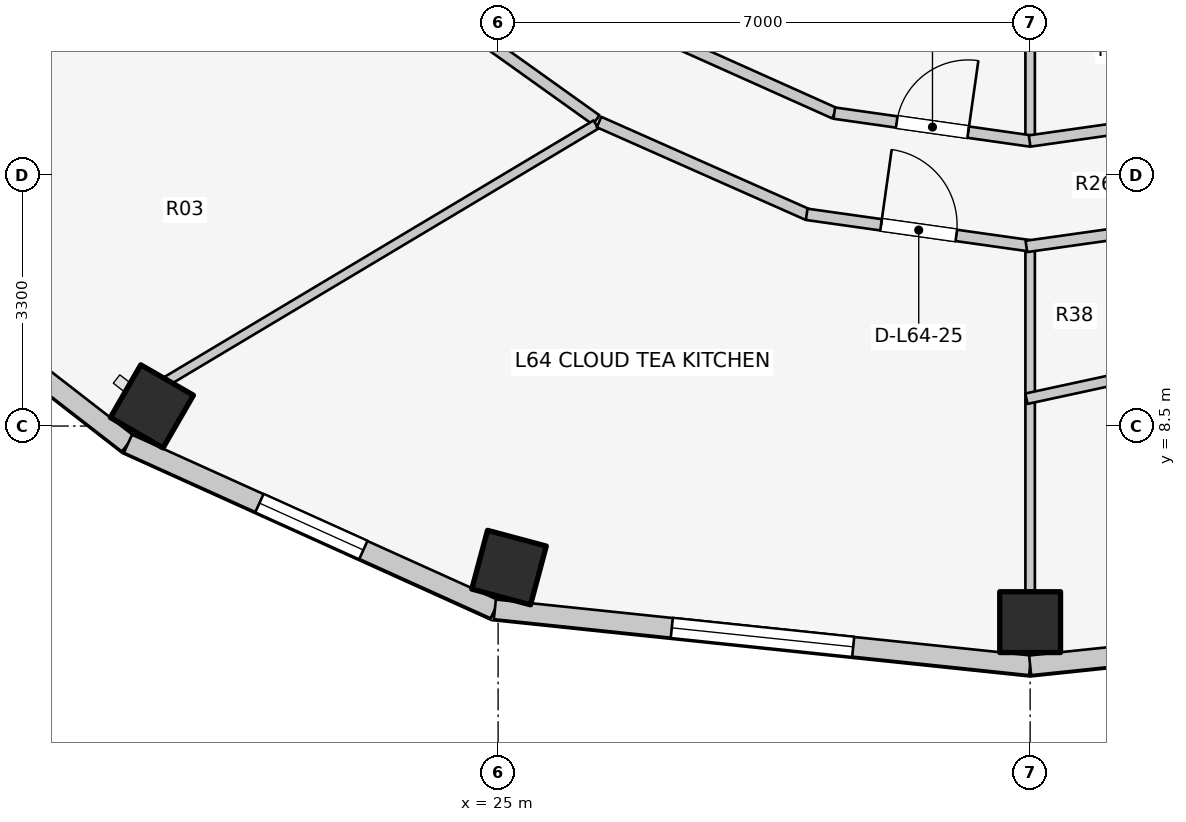
"""IFC4 building model, lengths in metres.
Left out: names, types, materials, properties, quantities, classifications, styles, units other than length and angle.
Written with IfcOpenShell. Run it as: python <this file> out.ifc"""

import sys

from ifc_helpers import new_model, si_unit, direction, frame, frame_2d, origin, origin_2d, place, context, subcontext, project, spatial, rectangle, extrude, element, fill, save


model = new_model("IFC4")
c1 = context("Model", 3, precision=1e-05, world=origin(), true_north=direction((0.0, 1.0)))
c2 = subcontext(c1, "Body", "Model", "MODEL_VIEW")
j1 = project(units=[si_unit("LENGTHUNIT", "METRE"), si_unit("PLANEANGLEUNIT", "RADIAN")], contexts=[c1])
p1 = place(None, origin())
s1 = spatial("IfcSite", under=j1, at=p1, CompositionType="ELEMENT")
p2 = place(p1, origin())
s2 = spatial("IfcBuilding", under=s1, at=p2, CompositionType="ELEMENT")
p3 = place(p2, frame((0.0, 0.0, 210.9)))
s3 = spatial("IfcBuildingStorey", under=s2, at=p3, CompositionType="ELEMENT", Elevation=210.9)
for number, where, z_axis, x_axis in (
    (1, (20.445, 8.759, 0.0), (0.0, 0.0, 1.0), (-0.5, -0.866, 0.0)),
    (2, (25.144, 6.638, 0.0), (0.0, 0.0, 1.0), (-0.259, -0.966, 0.0)),
    (3, (32.0, 5.92, 0.0), (0.0, 0.0, 1.0), (0.0, -1.0, 0.0)),
):
    element("IfcColumn", number, at=place(p3, frame(where, z_axis=z_axis, x_axis=x_axis)), inside=s3, PredefinedType="COLUMN", context=c2, shape_type="SweptSolid", body=[
        extrude(rectangle(XDim=0.8, YDim=0.8, at=origin_2d()), origin(), (0.0, 0.0, 1.0), 3.1),
    ])
p4 = place(p3, frame((16.442, 11.128, 0.0), z_axis=(0.0, 0.0, 1.0), x_axis=(0.790126214723, -0.612944177563, 0.0)))
e4 = element("IfcWall", 4, at=p4, inside=s3, PredefinedType="STANDARD", context=c2, shape_type="SweptSolid", body=[
    extrude(rectangle(XDim=4.667, YDim=0.26, at=frame_2d((2.333, 0.0))), origin(), (0.0, 0.0, 1.0), 2.85),
])
p5 = place(p3, frame((20.13, 8.267, 0.0), z_axis=(0.0, 0.0, 1.0), x_axis=(0.911427484938, -0.411460738952, 0.0)))
e5 = element("IfcWall", 5, at=p5, inside=s3, PredefinedType="STANDARD", context=c2, shape_type="SweptSolid", body=[
    extrude(rectangle(XDim=5.296, YDim=0.26, at=frame_2d((2.648, 0.0))), origin(), (0.0, 0.0, 1.0), 2.85),
])
p6 = place(p5, frame((1.898, 0.0, 0.75)))
e6 = element("IfcOpeningElement", 6, at=p6, cuts=e5, PredefinedType="OPENING", context=c2, shape_type="SweptSolid", body=[
    extrude(rectangle(XDim=1.5, YDim=1.6, at=frame_2d((0.75, 0.8))), frame((0.0, 0.14, 0.0), z_axis=(0.0, -1.0, 0.0), x_axis=(1.0, 0.0, 0.0)), (0.0, 0.0, 1.0), 0.28),
])
p7 = place(p3, frame((24.957, 6.088, 0.0), z_axis=(0.0, 0.0, 1.0), x_axis=(0.994582822721, -0.103947144014, 0.0)))
e7 = element("IfcWall", 7, at=p7, inside=s3, PredefinedType="STANDARD", context=c2, shape_type="SweptSolid", body=[
    extrude(rectangle(XDim=7.081, YDim=0.26, at=frame_2d((3.541, 0.0))), origin(), (0.0, 0.0, 1.0), 2.85),
])
p8 = place(p7, frame((2.341, 0.0, 0.75)))
e8 = element("IfcOpeningElement", 8, at=p8, cuts=e7, PredefinedType="OPENING", context=c2, shape_type="SweptSolid", body=[
    extrude(rectangle(XDim=2.4, YDim=1.7, at=frame_2d((1.2, 0.85))), frame((0.0, 0.14, 0.0), z_axis=(0.0, -1.0, 0.0), x_axis=(1.0, 0.0, 0.0)), (0.0, 0.0, 1.0), 0.28),
])
p9 = place(p3, frame((32.0, 5.352, 0.0), z_axis=(0.0, 0.0, 1.0), x_axis=(0.994582822721, 0.103947144014, 0.0)))
e9 = element("IfcWall", 9, at=p9, inside=s3, PredefinedType="STANDARD", context=c2, shape_type="SweptSolid", body=[
    extrude(rectangle(XDim=7.081, YDim=0.26, at=frame_2d((3.541, 0.0))), origin(), (0.0, 0.0, 1.0), 2.85),
])
p10 = place(p9, frame((2.791, 0.0, 0.75)))
e10 = element("IfcOpeningElement", 10, at=p10, cuts=e9, PredefinedType="OPENING", context=c2, shape_type="SweptSolid", body=[
    extrude(rectangle(XDim=1.5, YDim=1.6, at=frame_2d((0.75, 0.8))), frame((0.0, 0.14, 0.0), z_axis=(0.0, -1.0, 0.0), x_axis=(1.0, 0.0, 0.0)), (0.0, 0.0, 1.0), 0.28),
])
p11 = place(p3, frame((32.0, 14.9, 0.0), z_axis=(0.0, 0.0, 1.0), x_axis=(0.0, -1.0, 0.0)))
e11 = element("IfcWall", 11, at=p11, inside=s3, PredefinedType="PARTITIONING", context=c2, shape_type="SweptSolid", body=[
    extrude(rectangle(XDim=2.65, YDim=0.125, at=frame_2d((1.325, 0.0))), origin(), (0.0, 0.0, 1.0), 2.376),
])
p12 = place(p3, frame((27.019, 13.694, 0.0), z_axis=(0.0, 0.0, 1.0), x_axis=(0.912628408652, -0.408790151203, 0.0)))
e12 = element("IfcWall", 12, at=p12, inside=s3, PredefinedType="PARTITIONING", context=c2, shape_type="SweptSolid", body=[
    extrude(rectangle(XDim=2.638, YDim=0.15, at=frame_2d((1.319, 0.0))), origin(), (0.0, 0.0, 1.0), 2.376),
])
p13 = place(p3, frame((29.423, 12.617, 0.0), z_axis=(0.0, 0.0, 1.0), x_axis=(0.990078185178, -0.140517569133, 0.0)))
e13 = element("IfcWall", 13, at=p13, inside=s3, PredefinedType="PARTITIONING", context=c2, shape_type="SweptSolid", body=[
    extrude(rectangle(XDim=2.61, YDim=0.15, at=frame_2d((1.305, 0.0))), origin(), (0.0, 0.0, 1.0), 2.376),
])
p14 = place(p13, frame((0.83, 0.0, 0.0)))
e14 = element("IfcOpeningElement", 14, at=p14, cuts=e13, PredefinedType="OPENING", context=c2, shape_type="SweptSolid", body=[
    extrude(rectangle(XDim=0.95, YDim=2.1, at=frame_2d((0.475, 1.05))), frame((0.0, 0.085, 0.0), z_axis=(0.0, -1.0, 0.0), x_axis=(1.0, 0.0, 0.0)), (0.0, 0.0, 1.0), 0.17),
])
p15 = place(p3, frame((31.993, 12.25, 0.0), z_axis=(0.0, 0.0, 1.0), x_axis=(0.990078185178, 0.140517569133, 0.0)))
e15 = element("IfcWall", 15, at=p15, inside=s3, PredefinedType="PARTITIONING", context=c2, shape_type="SweptSolid", body=[
    extrude(rectangle(XDim=2.61, YDim=0.15, at=frame_2d((1.305, 0.0))), origin(), (0.0, 0.0, 1.0), 2.376),
])
p16 = place(p3, frame((26.29, 12.527, 0.0), z_axis=(0.0, 0.0, 1.0), x_axis=(-0.813780999276, 0.581171648669, 0.0)))
e16 = element("IfcWall", 16, at=p16, inside=s3, PredefinedType="PARTITIONING", context=c2, shape_type="SweptSolid", body=[
    extrude(rectangle(XDim=2.082, YDim=0.15, at=frame_2d((1.041, 0.0))), origin(), (0.0, 0.0, 1.0), 2.376),
])
p17 = place(p3, frame((26.288, 12.467, 0.0), z_axis=(0.0, 0.0, 1.0), x_axis=(-0.858332411245, -0.513094018487, 0.0)))
e17 = element("IfcWall", 17, at=p17, inside=s3, PredefinedType="PARTITIONING", context=c2, shape_type="SweptSolid", body=[
    extrude(rectangle(XDim=6.586, YDim=0.125, at=frame_2d((3.293, 0.0))), origin(), (0.0, 0.0, 1.0), 2.376),
])
p18 = place(p3, frame((32.0, 10.815, 0.0), z_axis=(0.0, 0.0, 1.0), x_axis=(0.0, -1.0, 0.0)))
e18 = element("IfcWall", 18, at=p18, inside=s3, PredefinedType="PARTITIONING", context=c2, shape_type="SweptSolid", body=[
    extrude(rectangle(XDim=4.515, YDim=0.125, at=frame_2d((2.257, 0.0))), origin(), (0.0, 0.0, 1.0), 2.376),
])
p19 = place(p3, frame((26.328, 12.499, 0.0), z_axis=(0.0, 0.0, 1.0), x_axis=(0.914139569865, -0.405399613724, 0.0)))
e19 = element("IfcWall", 19, at=p19, inside=s3, PredefinedType="PARTITIONING", context=c2, shape_type="SweptSolid", body=[
    extrude(rectangle(XDim=3.005, YDim=0.15, at=frame_2d((1.502, 0.0))), origin(), (0.0, 0.0, 1.0), 2.376),
])
p20 = place(p3, frame((29.06, 11.285, 0.0), z_axis=(0.0, 0.0, 1.0), x_axis=(0.99022315503, -0.139492305317, 0.0)))
e20 = element("IfcWall", 20, at=p20, inside=s3, PredefinedType="PARTITIONING", context=c2, shape_type="SweptSolid", body=[
    extrude(rectangle(XDim=2.977, YDim=0.15, at=frame_2d((1.489, 0.0))), origin(), (0.0, 0.0, 1.0), 2.376),
])
p21 = place(p20, frame((0.989, 0.0, 0.0)))
e21 = element("IfcOpeningElement", 21, at=p21, cuts=e20, PredefinedType="OPENING", context=c2, shape_type="SweptSolid", body=[
    extrude(rectangle(XDim=1.0, YDim=2.1, at=frame_2d((0.5, 1.05))), frame((0.0, 0.085, 0.0), z_axis=(0.0, -1.0, 0.0), x_axis=(1.0, 0.0, 0.0)), (0.0, 0.0, 1.0), 0.17),
])
p22 = place(p3, frame((31.95, 10.863, 0.0), z_axis=(0.0, 0.0, 1.0), x_axis=(0.990214091671, 0.13955662885, 0.0)))
e22 = element("IfcWall", 22, at=p22, inside=s3, PredefinedType="PARTITIONING", context=c2, shape_type="SweptSolid", body=[
    extrude(rectangle(XDim=3.062, YDim=0.15, at=frame_2d((1.531, 0.0))), origin(), (0.0, 0.0, 1.0), 2.376),
])
p23 = place(p3, frame((31.951, 8.859, 0.0), z_axis=(0.0, 0.0, 1.0), x_axis=(0.977405310504, 0.211373742452, 0.0)))
e23 = element("IfcWall", 23, at=p23, inside=s3, PredefinedType="PLUMBINGWALL", context=c2, shape_type="SweptSolid", body=[
    extrude(rectangle(XDim=4.464, YDim=0.14, at=frame_2d((2.232, 0.0))), origin(), (0.0, 0.0, 1.0), 2.376),
])
p24 = place(p23, frame((1.782, 0.0, 0.0)))
e24 = element("IfcOpeningElement", 24, at=p24, cuts=e23, PredefinedType="OPENING", context=c2, shape_type="SweptSolid", body=[
    extrude(rectangle(XDim=0.9, YDim=2.1, at=frame_2d((0.45, 1.05))), frame((0.0, 0.08, 0.0), z_axis=(0.0, -1.0, 0.0), x_axis=(1.0, 0.0, 0.0)), (0.0, 0.0, 1.0), 0.16),
])
p25 = place(p6, origin())
e25 = element("IfcWindow", 25, at=p25, inside=s3, PartitioningType="SINGLE_PANEL", PredefinedType="WINDOW", context=c2, shape_type="SweptSolid", body=[
    extrude(rectangle(XDim=1.5, YDim=1.6, at=frame_2d((0.75, 0.8))), frame((0.0, 0.03, 0.0), z_axis=(0.0, -1.0, 0.0), x_axis=(1.0, 0.0, 0.0)), (0.0, 0.0, 1.0), 0.06),
])
fill(e6, e25)
p26 = place(p8, origin())
e26 = element("IfcWindow", 26, at=p26, inside=s3, PartitioningType="SINGLE_PANEL", PredefinedType="WINDOW", context=c2, shape_type="SweptSolid", body=[
    extrude(rectangle(XDim=2.4, YDim=1.7, at=frame_2d((1.2, 0.85))), frame((0.0, 0.03, 0.0), z_axis=(0.0, -1.0, 0.0), x_axis=(1.0, 0.0, 0.0)), (0.0, 0.0, 1.0), 0.06),
])
fill(e8, e26)
p27 = place(p14, origin())
e27 = element("IfcDoor", 27, at=p27, inside=s3, OperationType="SINGLE_SWING_RIGHT", PredefinedType="DOOR", context=c2, shape_type="SweptSolid", body=[
    extrude(rectangle(XDim=0.95, YDim=2.1, at=frame_2d((0.475, 1.05))), frame((0.0, 0.025, 0.0), z_axis=(0.0, -1.0, 0.0), x_axis=(1.0, 0.0, 0.0)), (0.0, 0.0, 1.0), 0.05),
])
fill(e14, e27)
p28 = place(p21, origin())
e28 = element("IfcDoor", 28, at=p28, inside=s3, OperationType="SINGLE_SWING_LEFT", PredefinedType="DOOR", context=c2, shape_type="SweptSolid", body=[
    extrude(rectangle(XDim=1.0, YDim=2.1, at=frame_2d((0.5, 1.05))), frame((0.0, 0.025, 0.0), z_axis=(0.0, -1.0, 0.0), x_axis=(1.0, 0.0, 0.0)), (0.0, 0.0, 1.0), 0.05),
])
fill(e21, e28)
save(model, sys.argv[1])
